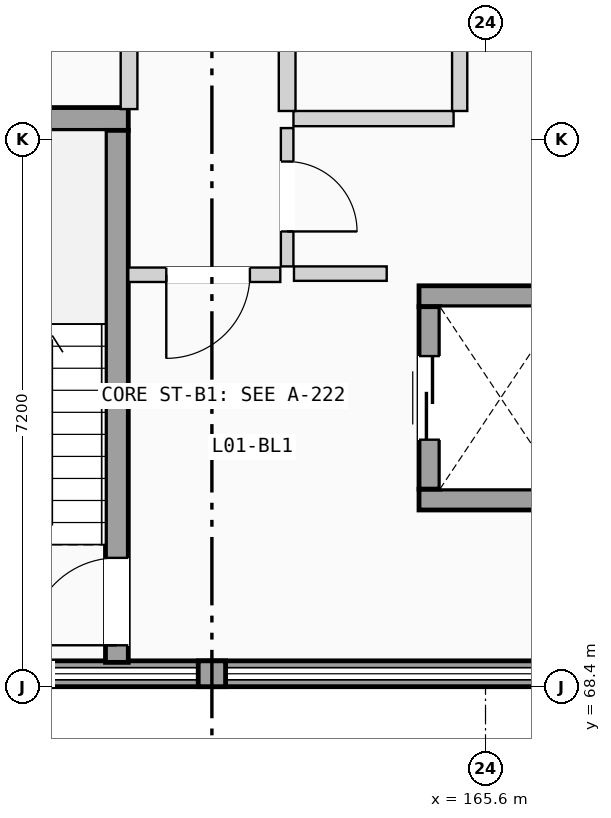
"""IFC4 building model, lengths in metres.
Left out: names, types, materials, properties, quantities, classifications, styles, units other than length and angle.
Written with IfcOpenShell. Run it as: python <this file> out.ifc"""

import sys

from ifc_helpers import new_model, si_unit, direction, frame, frame_2d, origin, place, context, subcontext, project, spatial, rectangle, extrude, element, fill, save


model = new_model("IFC4")
c1 = context("Model", 3, precision=1e-05, world=origin(), true_north=direction((0.0, 1.0)))
c2 = subcontext(c1, "Body", "Model", "MODEL_VIEW")
j1 = project(units=[si_unit("LENGTHUNIT", "METRE"), si_unit("PLANEANGLEUNIT", "RADIAN")], contexts=[c1])
p1 = place(None, origin())
s1 = spatial("IfcSite", under=j1, at=p1, CompositionType="ELEMENT")
p2 = place(p1, origin())
s2 = spatial("IfcBuilding", under=s1, at=p2, CompositionType="ELEMENT")
p3 = place(p2, frame((0.0, 0.0, 4.9)))
s3 = spatial("IfcBuildingStorey", under=s2, at=p3, CompositionType="ELEMENT", Elevation=4.9)
p4 = place(p3, frame((151.2, 68.57, 0.0), z_axis=(0.0, 0.0, 1.0), x_axis=(1.0, 0.0, 0.0)))
e1 = element("IfcWall", 1, at=p4, inside=s3, PredefinedType="SOLIDWALL", context=c2, shape_type="SweptSolid", body=[
    extrude(rectangle(XDim=21.6, YDim=0.34, at=frame_2d((10.8, 0.0))), origin(), (0.0, 0.0, 1.0), 1.11),
])
p5 = place(p3, frame((161.82, 68.57, 1.11), z_axis=(0.0, 0.0, 1.0), x_axis=(1.0, 0.0, 0.0)))
e2 = element("IfcWall", 2, at=p5, inside=s3, PredefinedType="SOLIDWALL", context=c2, shape_type="SweptSolid", body=[
    extrude(rectangle(XDim=0.36, YDim=0.34, at=frame_2d((0.18, 0.0))), origin(), (0.0, 0.0, 1.0), 2.305),
])
p6 = place(p3, frame((156.975, 75.87, 0.0), z_axis=(0.0, 0.0, 1.0), x_axis=(1.0, 0.0, 0.0)))
e3 = element("IfcWall", 3, at=p6, inside=s3, PredefinedType="SHEAR", context=c2, shape_type="SweptSolid", body=[
    extrude(rectangle(XDim=3.925, YDim=0.3, at=frame_2d((1.962, 0.0))), origin(), (0.0, 0.0, 1.0), 3.415),
])
p7 = place(p3, frame((160.75, 68.72, 0.0), z_axis=(0.0, 0.0, 1.0), x_axis=(0.0, 1.0, 0.0)))
e4 = element("IfcWall", 4, at=p7, inside=s3, PredefinedType="SHEAR", context=c2, shape_type="SweptSolid", body=[
    extrude(rectangle(XDim=7.0, YDim=0.3, at=frame_2d((3.5, 0.0))), origin(), (0.0, 0.0, 1.0), 3.415),
])
p8 = place(p7, frame((0.225, 0.0, 0.0)))
e5 = element("IfcOpeningElement", 5, at=p8, cuts=e4, PredefinedType="OPENING", context=c2, shape_type="SweptSolid", body=[
    extrude(rectangle(XDim=1.15, YDim=2.12, at=frame_2d((0.575, 1.06))), frame((0.0, 0.16, 0.0), z_axis=(0.0, -1.0, 0.0), x_axis=(1.0, 0.0, 0.0)), (0.0, 0.0, 1.0), 0.32),
])
for number, where, z_axis, x_axis in (
    (6, (164.725, 70.863, 0.0), (0.0, 0.0, 1.0), (1.0, 0.0, 0.0)),
    (7, (164.725, 73.538, 0.0), (0.0, 0.0, 1.0), (1.0, 0.0, 0.0)),
):
    element("IfcWall", number, at=place(p3, frame(where, z_axis=z_axis, x_axis=x_axis)), inside=s3, PredefinedType="SHEAR", context=c2, shape_type="SweptSolid", body=[
        extrude(rectangle(XDim=2.15, YDim=0.275, at=frame_2d((1.075, 0.0))), origin(), (0.0, 0.0, 1.0), 3.415),
    ])
p9 = place(p3, frame((164.863, 71.0, 0.0), z_axis=(0.0, 0.0, 1.0), x_axis=(0.0, 1.0, 0.0)))
e8 = element("IfcWall", 8, at=p9, inside=s3, PredefinedType="SHEAR", context=c2, shape_type="SweptSolid", body=[
    extrude(rectangle(XDim=2.4, YDim=0.275, at=frame_2d((1.2, 0.0))), origin(), (0.0, 0.0, 1.0), 3.415),
])
p10 = place(p9, frame((0.65, 0.0, 0.0)))
e9 = element("IfcOpeningElement", 9, at=p10, cuts=e8, PredefinedType="OPENING", context=c2, shape_type="SweptSolid", body=[
    extrude(rectangle(XDim=1.1, YDim=2.15, at=frame_2d((0.55, 1.075))), frame((0.0, 0.147, 0.0), z_axis=(0.0, -1.0, 0.0), x_axis=(1.0, 0.0, 0.0)), (0.0, 0.0, 1.0), 0.295),
])
p11 = place(p3, frame((163.08, 73.835, 0.0), z_axis=(0.0, 0.0, 1.0), x_axis=(1.0, 0.0, 0.0)))
e10 = element("IfcWall", 10, at=p11, inside=s3, PredefinedType="PARTITIONING", context=c2, shape_type="SweptSolid", body=[
    extrude(rectangle(XDim=1.22, YDim=0.19, at=frame_2d((0.61, 0.0))), origin(), (0.0, 0.0, 1.0), 3.395),
])
p12 = place(p3, frame((160.9, 73.82, 0.0), z_axis=(0.0, 0.0, 1.0), x_axis=(1.0, 0.0, 0.0)))
e11 = element("IfcWall", 11, at=p12, inside=s3, PredefinedType="PARTITIONING", context=c2, shape_type="SweptSolid", body=[
    extrude(rectangle(XDim=2.0, YDim=0.19, at=frame_2d((1.0, 0.0))), origin(), (0.0, 0.0, 1.0), 3.395),
])
p13 = place(p12, frame((0.5, 0.0, 0.0)))
e12 = element("IfcOpeningElement", 12, at=p13, cuts=e11, PredefinedType="OPENING", context=c2, shape_type="SweptSolid", body=[
    extrude(rectangle(XDim=1.1, YDim=2.12, at=frame_2d((0.55, 1.06))), frame((0.0, 0.105, 0.0), z_axis=(0.0, -1.0, 0.0), x_axis=(1.0, 0.0, 0.0)), (0.0, 0.0, 1.0), 0.21),
])
p14 = place(p3, frame((162.99, 73.93, 0.0), z_axis=(0.0, 0.0, 1.0), x_axis=(0.0, 1.0, 0.0)))
e13 = element("IfcWall", 13, at=p14, inside=s3, PredefinedType="PARTITIONING", context=c2, shape_type="SweptSolid", body=[
    extrude(rectangle(XDim=1.82, YDim=0.165, at=frame_2d((0.91, 0.0))), origin(), (0.0, 0.0, 1.0), 3.395),
])
p15 = place(p14, frame((0.46, 0.0, 0.0)))
e14 = element("IfcOpeningElement", 14, at=p15, cuts=e13, PredefinedType="OPENING", context=c2, shape_type="SweptSolid", body=[
    extrude(rectangle(XDim=0.92, YDim=2.04, at=frame_2d((0.46, 1.02))), frame((0.0, 0.093, 0.0), z_axis=(0.0, -1.0, 0.0), x_axis=(1.0, 0.0, 0.0)), (0.0, 0.0, 1.0), 0.185),
])
p16 = place(p3, frame((163.073, 75.875, 0.0), z_axis=(0.0, 0.0, 1.0), x_axis=(1.0, 0.0, 0.0)))
e15 = element("IfcWall", 15, at=p16, inside=s3, PredefinedType="PLUMBINGWALL", context=c2, shape_type="SweptSolid", body=[
    extrude(rectangle(XDim=2.107, YDim=0.2, at=frame_2d((1.053, 0.0))), origin(), (0.0, 0.0, 1.0), 3.395),
])
p17 = place(p3, frame((160.91, 76.0, 0.0), z_axis=(0.0, 0.0, 1.0), x_axis=(0.0, 1.0, 0.0)))
e16 = element("IfcWall", 16, at=p17, inside=s3, PredefinedType="PLUMBINGWALL", context=c2, shape_type="SweptSolid", body=[
    extrude(rectangle(XDim=4.475, YDim=0.22, at=frame_2d((2.238, 0.0))), origin(), (0.0, 0.0, 1.0), 3.395),
])
p18 = place(p3, frame((162.99, 75.975, 0.0), z_axis=(0.0, 0.0, 1.0), x_axis=(0.0, 1.0, 0.0)))
e17 = element("IfcWall", 17, at=p18, inside=s3, PredefinedType="PLUMBINGWALL", context=c2, shape_type="SweptSolid", body=[
    extrude(rectangle(XDim=4.5, YDim=0.22, at=frame_2d((2.25, 0.0))), origin(), (0.0, 0.0, 1.0), 3.395),
])
p19 = place(p3, frame((165.26, 75.975, 0.0), z_axis=(0.0, 0.0, 1.0), x_axis=(0.0, 1.0, 0.0)))
e18 = element("IfcWall", 18, at=p19, inside=s3, PredefinedType="PLUMBINGWALL", context=c2, shape_type="SweptSolid", body=[
    extrude(rectangle(XDim=4.505, YDim=0.2, at=frame_2d((2.252, 0.0))), origin(), (0.0, 0.0, 1.0), 3.395),
])
p20 = place(p8, origin())
e19 = element("IfcDoor", 19, at=p20, inside=s3, OperationType="SINGLE_SWING_LEFT", PredefinedType="DOOR", context=c2, shape_type="SweptSolid", body=[
    extrude(rectangle(XDim=1.15, YDim=2.12, at=frame_2d((0.575, 1.06))), frame((0.0, 0.025, 0.0), z_axis=(0.0, -1.0, 0.0), x_axis=(1.0, 0.0, 0.0)), (0.0, 0.0, 1.0), 0.05),
])
fill(e5, e19)
p21 = place(p10, origin())
e20 = element("IfcDoor", 20, at=p21, inside=s3, OperationType="SLIDING_TO_LEFT", PredefinedType="DOOR", context=c2, shape_type="SweptSolid", body=[
    extrude(rectangle(XDim=1.1, YDim=2.15, at=frame_2d((0.55, 1.075))), frame((0.0, 0.025, 0.0), z_axis=(0.0, -1.0, 0.0), x_axis=(1.0, 0.0, 0.0)), (0.0, 0.0, 1.0), 0.05),
])
fill(e9, e20)
p22 = place(p13, frame((1.1, 0.0, 0.0), z_axis=(0.0, 0.0, 1.0), x_axis=(-1.0, 0.0, 0.0)))
e21 = element("IfcDoor", 21, at=p22, inside=s3, OperationType="SINGLE_SWING_LEFT", PredefinedType="DOOR", context=c2, shape_type="SweptSolid", body=[
    extrude(rectangle(XDim=1.1, YDim=2.12, at=frame_2d((0.55, 1.06))), frame((0.0, 0.025, 0.0), z_axis=(0.0, -1.0, 0.0), x_axis=(1.0, 0.0, 0.0)), (0.0, 0.0, 1.0), 0.05),
])
fill(e12, e21)
p23 = place(p15, frame((0.92, 0.0, 0.0), z_axis=(0.0, 0.0, 1.0), x_axis=(-1.0, 0.0, 0.0)))
e22 = element("IfcDoor", 22, at=p23, inside=s3, OperationType="SINGLE_SWING_LEFT", PredefinedType="DOOR", context=c2, shape_type="SweptSolid", body=[
    extrude(rectangle(XDim=0.92, YDim=2.04, at=frame_2d((0.46, 1.02))), frame((0.0, 0.025, 0.0), z_axis=(0.0, -1.0, 0.0), x_axis=(1.0, 0.0, 0.0)), (0.0, 0.0, 1.0), 0.05),
])
fill(e14, e22)
save(model, sys.argv[1])
